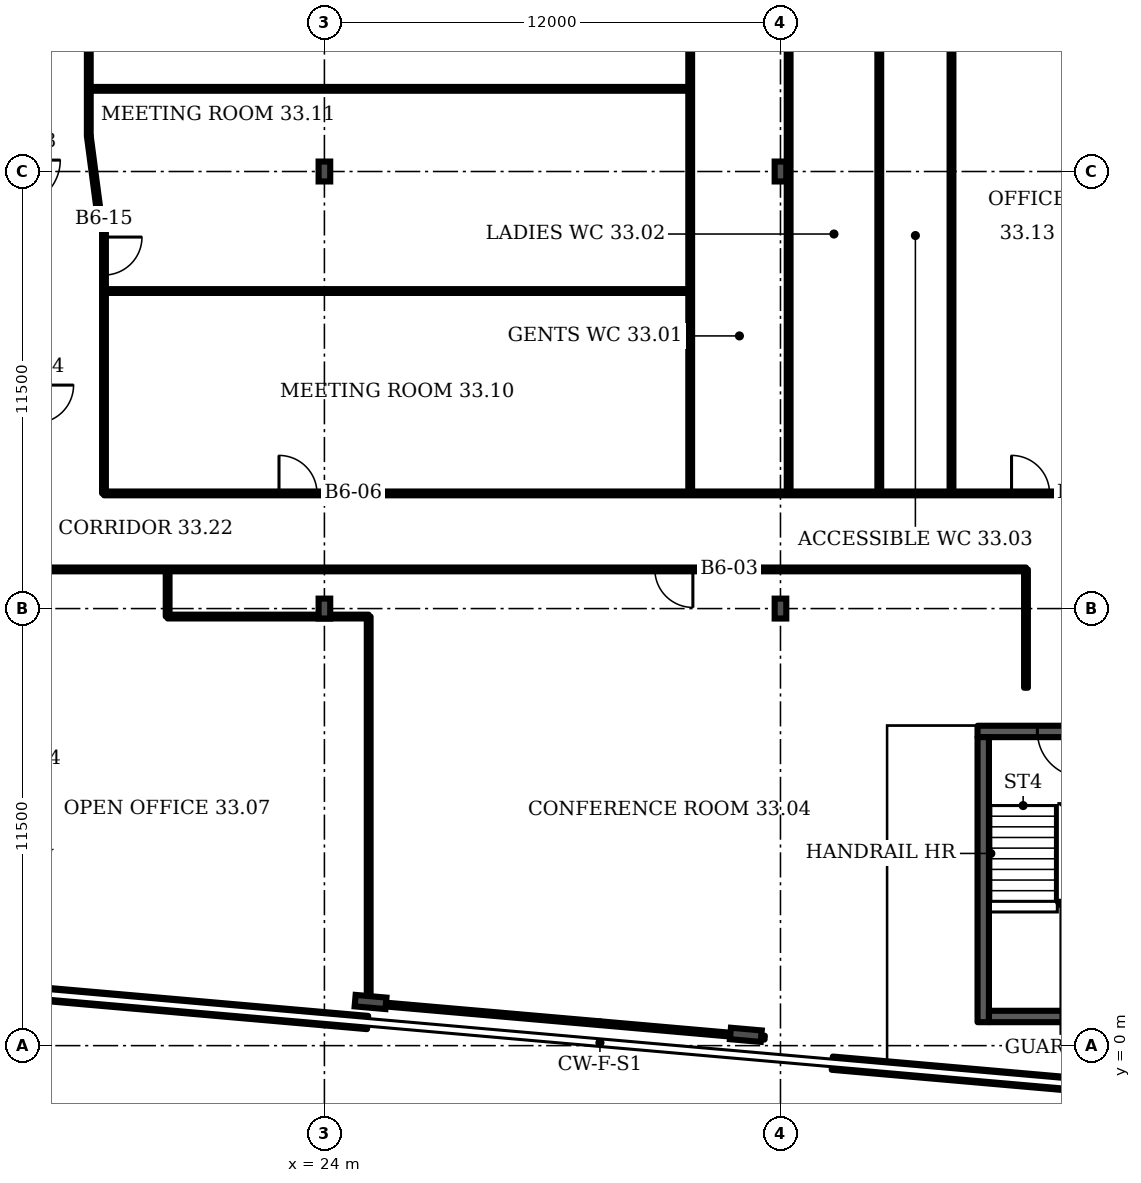
"""IFC4 building model, lengths in metres.
Left out: names, types, materials, properties, quantities, classifications, styles, units other than length and angle.
Written with IfcOpenShell. Run it as: python <this file> out.ifc"""

import sys

from ifc_helpers import new_model, si_unit, direction, frame, frame_2d, origin, origin_2d, place, context, subcontext, project, spatial, rectangle, i_section, extrude, element, fill, save


model = new_model("IFC4")
c1 = context("Model", 3, precision=1e-05, world=origin(), true_north=direction((0.0, 1.0)))
c2 = subcontext(c1, "Body", "Model", "MODEL_VIEW")
j1 = project(units=[si_unit("LENGTHUNIT", "METRE"), si_unit("PLANEANGLEUNIT", "RADIAN")], contexts=[c1])
p1 = place(None, origin())
s1 = spatial("IfcSite", under=j1, at=p1, CompositionType="ELEMENT")
p2 = place(p1, origin())
s2 = spatial("IfcBuilding", under=s1, at=p2, CompositionType="ELEMENT")
p3 = place(p2, frame((0.0, 0.0, 139.9)))
s3 = spatial("IfcBuildingStorey", under=s2, at=p3, CompositionType="ELEMENT", Elevation=139.9)
for number, where, z_axis, x_axis in (
    (1, (25.214, 1.149, 0.0), (0.0, 0.0, 1.0), (-0.087, -0.996, 0.0)),
    (2, (35.089, 0.285, 0.0), (0.0, 0.0, 1.0), (-0.087, -0.996, 0.0)),
):
    element("IfcColumn", number, at=place(p3, frame(where, z_axis=z_axis, x_axis=x_axis)), inside=s3, PredefinedType="COLUMN", context=c2, shape_type="SweptSolid", body=[
        extrude(i_section(OverallWidth=0.303, OverallDepth=0.814, WebThickness=0.021, FlangeThickness=0.04, FilletRadius=0.03, at=origin_2d()), origin(), (0.0, 0.0, 1.0), 3.6),
    ])
for number, where, z_axis, x_axis in (
    (3, (24.0, 11.5, 0.0), (0.0, 0.0, 1.0), (1.0, 0.0, 0.0)),
    (4, (36.0, 11.5, 0.0), (0.0, 0.0, 1.0), (1.0, 0.0, 0.0)),
    (5, (24.0, 23.0, 0.0), (0.0, 0.0, 1.0), (1.0, 0.0, 0.0)),
    (6, (36.0, 23.0, 0.0), (0.0, 0.0, 1.0), (1.0, 0.0, 0.0)),
):
    element("IfcColumn", number, at=place(p3, frame(where, z_axis=z_axis, x_axis=x_axis)), inside=s3, PredefinedType="COLUMN", context=c2, shape_type="SweptSolid", body=[
        extrude(i_section(OverallWidth=0.306, OverallDepth=0.524, WebThickness=0.021, FlangeThickness=0.04, FilletRadius=0.027, at=origin_2d()), origin(), (0.0, 0.0, 1.0), 3.6),
    ])
p4 = place(p3, frame((12.835, 1.685, 0.0), z_axis=(0.0, 0.0, 1.0), x_axis=(0.996192, -0.087173, 0.0)))
e7 = element("IfcWall", 7, at=p4, inside=s3, PredefinedType="SOLIDWALL", context=c2, shape_type="SweptSolid", body=[
    extrude(rectangle(XDim=12.348, YDim=0.35, at=frame_2d((6.174, 0.0))), origin(), (0.0, 0.0, 1.0), 1.0),
])
p5 = place(p3, frame((37.363, -0.461, 0.0), z_axis=(0.0, 0.0, 1.0), x_axis=(0.996194, -0.087159, 0.0)))
e8 = element("IfcWall", 8, at=p5, inside=s3, PredefinedType="SOLIDWALL", context=c2, shape_type="SweptSolid", body=[
    extrude(rectangle(XDim=12.199, YDim=0.35, at=frame_2d((6.099, 0.0))), origin(), (0.0, 0.0, 1.0), 1.0),
])
p6 = place(p3, frame((41.185, 8.267, 0.0), z_axis=(0.0, 0.0, 1.0), x_axis=(1.0, 0.0, 0.0)))
e9 = element("IfcWall", 9, at=p6, inside=s3, PredefinedType="SHEAR", context=c2, shape_type="SweptSolid", body=[
    extrude(rectangle(XDim=4.35, YDim=0.3, at=frame_2d((2.175, 0.0))), origin(), (0.0, 0.0, 1.0), 3.2),
])
p7 = place(p6, frame((1.575, 0.0, 0.0)))
e10 = element("IfcOpeningElement", 10, at=p7, cuts=e9, PredefinedType="OPENING", context=c2, shape_type="SweptSolid", body=[
    extrude(rectangle(XDim=1.2, YDim=2.1, at=frame_2d((0.6, 1.05))), frame((0.0, 0.16, 0.0), z_axis=(0.0, -1.0, 0.0), x_axis=(1.0, 0.0, 0.0)), (0.0, 0.0, 1.0), 0.32),
])
p8 = place(p3, frame((7.02, 12.53, 0.0), z_axis=(0.0, 0.0, 1.0), x_axis=(1.0, 0.0, 0.0)))
e11 = element("IfcWall", 11, at=p8, inside=s3, PredefinedType="PARTITIONING", context=c2, shape_type="SweptSolid", body=[
    extrude(rectangle(XDim=35.44, YDim=0.1, at=frame_2d((17.72, 0.0))), origin(), (0.0, 0.0, 1.0), 3.2),
])
p9 = place(p8, frame((5.6, 0.0, 0.0)))
e12 = element("IfcOpeningElement", 12, at=p9, cuts=e11, PredefinedType="OPENING", context=c2, shape_type="SweptSolid", body=[
    extrude(rectangle(XDim=1.8, YDim=2.1, at=frame_2d((0.9, 1.05))), frame((0.0, 0.06, 0.0), z_axis=(0.0, -1.0, 0.0), x_axis=(1.0, 0.0, 0.0)), (0.0, 0.0, 1.0), 0.12),
])
p10 = place(p8, frame((25.675, 0.0, 0.0)))
e13 = element("IfcOpeningElement", 13, at=p10, cuts=e11, PredefinedType="OPENING", context=c2, shape_type="SweptSolid", body=[
    extrude(rectangle(XDim=1.0, YDim=2.1, at=frame_2d((0.5, 1.05))), frame((0.0, 0.06, 0.0), z_axis=(0.0, -1.0, 0.0), x_axis=(1.0, 0.0, 0.0)), (0.0, 0.0, 1.0), 0.12),
])
p11 = place(p3, frame((17.8, 23.935, 0.0), z_axis=(0.0, 0.0, 1.0), x_axis=(0.0, 1.0, 0.0)))
e14 = element("IfcWall", 14, at=p11, inside=s3, PredefinedType="PARTITIONING", context=c2, shape_type="SweptSolid", body=[
    extrude(rectangle(XDim=6.565, YDim=0.1, at=frame_2d((3.282, 0.0))), origin(), (0.0, 0.0, 1.0), 3.2),
])
p12 = place(p3, frame((17.8, 25.175, 0.0), z_axis=(0.0, 0.0, 1.0), x_axis=(1.0, 0.0, 0.0)))
e15 = element("IfcWall", 15, at=p12, inside=s3, PredefinedType="PARTITIONING", context=c2, shape_type="SweptSolid", body=[
    extrude(rectangle(XDim=15.825, YDim=0.1, at=frame_2d((7.913, 0.0))), origin(), (0.0, 0.0, 1.0), 3.2),
])
p13 = place(p3, frame((18.1, 21.66, 0.0), z_axis=(0.0, 0.0, 1.0), x_axis=(-0.130749, 0.991416, 0.0)))
e16 = element("IfcWall", 16, at=p13, inside=s3, PredefinedType="PARTITIONING", context=c2, shape_type="SweptSolid", body=[
    extrude(rectangle(XDim=2.295, YDim=0.1, at=frame_2d((1.147, 0.0))), origin(), (0.0, 0.0, 1.0), 3.2),
])
p14 = place(p3, frame((18.2, 14.53, 0.0), z_axis=(0.0, 0.0, 1.0), x_axis=(0.0, 1.0, 0.0)))
e17 = element("IfcWall", 17, at=p14, inside=s3, PredefinedType="PARTITIONING", context=c2, shape_type="SweptSolid", body=[
    extrude(rectangle(XDim=7.02, YDim=0.1, at=frame_2d((3.51, 0.0))), origin(), (0.0, 0.0, 1.0), 3.2),
])
p15 = place(p14, frame((5.745, 0.0, 0.0)))
e18 = element("IfcOpeningElement", 18, at=p15, cuts=e17, PredefinedType="OPENING", context=c2, shape_type="SweptSolid", body=[
    extrude(rectangle(XDim=1.0, YDim=2.1, at=frame_2d((0.5, 1.05))), frame((0.0, 0.06, 0.0), z_axis=(0.0, -1.0, 0.0), x_axis=(1.0, 0.0, 0.0)), (0.0, 0.0, 1.0), 0.12),
])
p16 = place(p3, frame((18.2, 14.53, 0.0), z_axis=(0.0, 0.0, 1.0), x_axis=(1.0, 0.0, 0.0)))
e19 = element("IfcWall", 19, at=p16, inside=s3, PredefinedType="PARTITIONING", context=c2, shape_type="SweptSolid", body=[
    extrude(rectangle(XDim=68.41, YDim=0.1, at=frame_2d((34.205, 0.0))), origin(), (0.0, 0.0, 1.0), 3.2),
])
p17 = place(p16, frame((4.605, 0.0, 0.0)))
e20 = element("IfcOpeningElement", 20, at=p17, cuts=e19, PredefinedType="OPENING", context=c2, shape_type="SweptSolid", body=[
    extrude(rectangle(XDim=1.0, YDim=2.1, at=frame_2d((0.5, 1.05))), frame((0.0, 0.06, 0.0), z_axis=(0.0, -1.0, 0.0), x_axis=(1.0, 0.0, 0.0)), (0.0, 0.0, 1.0), 0.12),
])
p18 = place(p16, frame((23.88, 0.0, 0.0)))
e21 = element("IfcOpeningElement", 21, at=p18, cuts=e19, PredefinedType="OPENING", context=c2, shape_type="SweptSolid", body=[
    extrude(rectangle(XDim=1.0, YDim=2.1, at=frame_2d((0.5, 1.05))), frame((0.0, 0.06, 0.0), z_axis=(0.0, -1.0, 0.0), x_axis=(1.0, 0.0, 0.0)), (0.0, 0.0, 1.0), 0.12),
])
p19 = place(p16, frame((27.8, 0.0, 0.0)))
e22 = element("IfcOpeningElement", 22, at=p19, cuts=e19, PredefinedType="OPENING", context=c2, shape_type="SweptSolid", body=[
    extrude(rectangle(XDim=1.0, YDim=2.1, at=frame_2d((0.5, 1.05))), frame((0.0, 0.06, 0.0), z_axis=(0.0, -1.0, 0.0), x_axis=(1.0, 0.0, 0.0)), (0.0, 0.0, 1.0), 0.12),
])
p20 = place(p16, frame((31.8, 0.0, 0.0)))
e23 = element("IfcOpeningElement", 23, at=p20, cuts=e19, PredefinedType="OPENING", context=c2, shape_type="SweptSolid", body=[
    extrude(rectangle(XDim=1.0, YDim=2.1, at=frame_2d((0.5, 1.05))), frame((0.0, 0.06, 0.0), z_axis=(0.0, -1.0, 0.0), x_axis=(1.0, 0.0, 0.0)), (0.0, 0.0, 1.0), 0.12),
])
p21 = place(p16, frame((35.8, 0.0, 0.0)))
e24 = element("IfcOpeningElement", 24, at=p21, cuts=e19, PredefinedType="OPENING", context=c2, shape_type="SweptSolid", body=[
    extrude(rectangle(XDim=1.0, YDim=2.1, at=frame_2d((0.5, 1.05))), frame((0.0, 0.06, 0.0), z_axis=(0.0, -1.0, 0.0), x_axis=(1.0, 0.0, 0.0)), (0.0, 0.0, 1.0), 0.12),
])
p22 = place(p16, frame((41.355, 0.0, 0.0)))
e25 = element("IfcOpeningElement", 25, at=p22, cuts=e19, PredefinedType="OPENING", context=c2, shape_type="SweptSolid", body=[
    extrude(rectangle(XDim=1.0, YDim=2.1, at=frame_2d((0.5, 1.05))), frame((0.0, 0.06, 0.0), z_axis=(0.0, -1.0, 0.0), x_axis=(1.0, 0.0, 0.0)), (0.0, 0.0, 1.0), 0.12),
])
p23 = place(p16, frame((50.88, 0.0, 0.0)))
e26 = element("IfcOpeningElement", 26, at=p23, cuts=e19, PredefinedType="OPENING", context=c2, shape_type="SweptSolid", body=[
    extrude(rectangle(XDim=1.8, YDim=2.1, at=frame_2d((0.9, 1.05))), frame((0.0, 0.06, 0.0), z_axis=(0.0, -1.0, 0.0), x_axis=(1.0, 0.0, 0.0)), (0.0, 0.0, 1.0), 0.12),
])
p24 = place(p16, frame((62.796, 0.0, 0.0)))
e27 = element("IfcOpeningElement", 27, at=p24, cuts=e19, PredefinedType="OPENING", context=c2, shape_type="SweptSolid", body=[
    extrude(rectangle(XDim=1.0, YDim=2.1, at=frame_2d((0.5, 1.05))), frame((0.0, 0.06, 0.0), z_axis=(0.0, -1.0, 0.0), x_axis=(1.0, 0.0, 0.0)), (0.0, 0.0, 1.0), 0.12),
])
p25 = place(p3, frame((18.2, 19.855, 0.0), z_axis=(0.0, 0.0, 1.0), x_axis=(1.0, 0.0, 0.0)))
e28 = element("IfcWall", 28, at=p25, inside=s3, PredefinedType="PARTITIONING", context=c2, shape_type="SweptSolid", body=[
    extrude(rectangle(XDim=15.425, YDim=0.1, at=frame_2d((7.712, 0.0))), origin(), (0.0, 0.0, 1.0), 3.2),
])
p26 = place(p3, frame((18.2, 21.55, 0.0), z_axis=(0.0, 0.0, 1.0), x_axis=(-0.672587, 0.74001, 0.0)))
e29 = element("IfcWall", 29, at=p26, inside=s3, PredefinedType="PARTITIONING", context=c2, shape_type="SweptSolid", body=[
    extrude(rectangle(XDim=0.148, YDim=0.1, at=frame_2d((0.074, 0.0))), origin(), (0.0, 0.0, 1.0), 3.2),
])
p27 = place(p3, frame((19.875, 11.29, 0.0), z_axis=(0.0, 0.0, 1.0), x_axis=(0.0, 1.0, 0.0)))
e30 = element("IfcWall", 30, at=p27, inside=s3, PredefinedType="PARTITIONING", context=c2, shape_type="SweptSolid", body=[
    extrude(rectangle(XDim=1.24, YDim=0.1, at=frame_2d((0.62, 0.0))), origin(), (0.0, 0.0, 1.0), 3.2),
])
p28 = place(p3, frame((19.875, 11.29, 0.0), z_axis=(0.0, 0.0, 1.0), x_axis=(1.0, 0.0, 0.0)))
e31 = element("IfcWall", 31, at=p28, inside=s3, PredefinedType="PARTITIONING", context=c2, shape_type="SweptSolid", body=[
    extrude(rectangle(XDim=5.29, YDim=0.1, at=frame_2d((2.645, 0.0))), origin(), (0.0, 0.0, 1.0), 3.2),
])
p29 = place(p3, frame((25.165, 1.12, 0.0), z_axis=(0.0, 0.0, 1.0), x_axis=(0.0, 1.0, 0.0)))
e32 = element("IfcWall", 32, at=p29, inside=s3, PredefinedType="PARTITIONING", context=c2, shape_type="SweptSolid", body=[
    extrude(rectangle(XDim=10.17, YDim=0.1, at=frame_2d((5.085, 0.0))), origin(), (0.0, 0.0, 1.0), 3.2),
])
p30 = place(p3, frame((31.25, 0.59, 0.0), z_axis=(0.0, 0.0, 1.0), x_axis=(-0.996225, 0.086776, 0.0)))
e33 = element("IfcWall", 33, at=p30, inside=s3, PredefinedType="PARTITIONING", context=c2, shape_type="SweptSolid", body=[
    extrude(rectangle(XDim=6.108, YDim=0.1, at=frame_2d((3.054, 0.0))), origin(), (0.0, 0.0, 1.0), 2.58),
])
p31 = place(p3, frame((33.625, 14.53, 0.0), z_axis=(0.0, 0.0, 1.0), x_axis=(0.0, 1.0, 0.0)))
e34 = element("IfcWall", 34, at=p31, inside=s3, PredefinedType="PARTITIONING", context=c2, shape_type="SweptSolid", body=[
    extrude(rectangle(XDim=15.96, YDim=0.1, at=frame_2d((7.98, 0.0))), origin(), (0.0, 0.0, 1.0), 3.2),
])
p32 = place(p3, frame((35.585, 0.21, 0.0), z_axis=(0.0, 0.0, 1.0), x_axis=(-0.996173, 0.087353, 0.0)))
e35 = element("IfcWall", 35, at=p32, inside=s3, PredefinedType="PARTITIONING", context=c2, shape_type="SweptSolid", body=[
    extrude(rectangle(XDim=4.352, YDim=0.1, at=frame_2d((2.176, 0.0))), origin(), (0.0, 0.0, 1.0), 2.58),
])
for number, where, z_axis, x_axis in (
    (36, (36.215, 14.53, 0.0), (0.0, 0.0, 1.0), (0.0, 1.0, 0.0)),
    (37, (38.6, 14.53, 0.0), (0.0, 0.0, 1.0), (0.0, 1.0, 0.0)),
    (38, (40.5, 14.53, 0.0), (0.0, 0.0, 1.0), (0.0, 1.0, 0.0)),
):
    element("IfcWall", number, at=place(p3, frame(where, z_axis=z_axis, x_axis=x_axis)), inside=s3, PredefinedType="PARTITIONING", context=c2, shape_type="SweptSolid", body=[
        extrude(rectangle(XDim=14.17, YDim=0.1, at=frame_2d((7.085, 0.0))), origin(), (0.0, 0.0, 1.0), 3.2),
    ])
p33 = place(p3, frame((42.46, 9.417, 0.0), z_axis=(0.0, 0.0, 1.0), x_axis=(0.0, 1.0, 0.0)))
e39 = element("IfcWall", 39, at=p33, inside=s3, PredefinedType="PARTITIONING", context=c2, shape_type="SweptSolid", body=[
    extrude(rectangle(XDim=3.113, YDim=0.1, at=frame_2d((1.557, 0.0))), origin(), (0.0, 0.0, 1.0), 3.2),
])
p34 = place(p3, frame((41.335, 0.617, 0.0), z_axis=(0.0, 0.0, 1.0), x_axis=(0.0, 1.0, 0.0)))
e40 = element("IfcWall", 40, at=p34, inside=s3, PredefinedType="SHEAR", context=c2, shape_type="SweptSolid", body=[
    extrude(rectangle(XDim=7.5, YDim=0.3, at=frame_2d((3.75, 0.0))), origin(), (0.0, 0.0, 1.0), 3.2),
])
p35 = place(p3, frame((41.485, 0.767, 0.0), z_axis=(0.0, 0.0, 1.0), x_axis=(1.0, 0.0, 0.0)))
e41 = element("IfcWall", 41, at=p35, inside=s3, PredefinedType="SHEAR", context=c2, shape_type="SweptSolid", body=[
    extrude(rectangle(XDim=3.75, YDim=0.3, at=frame_2d((1.875, 0.0))), origin(), (0.0, 0.0, 1.0), 3.2),
])
p36 = place(p7, origin())
e42 = element("IfcDoor", 42, at=p36, inside=s3, OperationType="SINGLE_SWING_RIGHT", PredefinedType="DOOR", context=c2, shape_type="SweptSolid", body=[
    extrude(rectangle(XDim=1.2, YDim=2.1, at=frame_2d((0.6, 1.05))), frame((0.0, 0.025, 0.0), z_axis=(0.0, -1.0, 0.0), x_axis=(1.0, 0.0, 0.0)), (0.0, 0.0, 1.0), 0.05),
])
fill(e10, e42)
p37 = place(p10, origin())
e43 = element("IfcDoor", 43, at=p37, inside=s3, OperationType="SINGLE_SWING_RIGHT", PredefinedType="DOOR", context=c2, shape_type="SweptSolid", body=[
    extrude(rectangle(XDim=1.0, YDim=2.1, at=frame_2d((0.5, 1.05))), frame((0.0, 0.025, 0.0), z_axis=(0.0, -1.0, 0.0), x_axis=(1.0, 0.0, 0.0)), (0.0, 0.0, 1.0), 0.05),
])
fill(e13, e43)
p38 = place(p17, origin())
e44 = element("IfcDoor", 44, at=p38, inside=s3, OperationType="SINGLE_SWING_LEFT", PredefinedType="DOOR", context=c2, shape_type="SweptSolid", body=[
    extrude(rectangle(XDim=1.0, YDim=2.1, at=frame_2d((0.5, 1.05))), frame((0.0, 0.025, 0.0), z_axis=(0.0, -1.0, 0.0), x_axis=(1.0, 0.0, 0.0)), (0.0, 0.0, 1.0), 0.05),
])
fill(e20, e44)
p39 = place(p18, origin())
e45 = element("IfcDoor", 45, at=p39, inside=s3, OperationType="SINGLE_SWING_LEFT", PredefinedType="DOOR", context=c2, shape_type="SweptSolid", body=[
    extrude(rectangle(XDim=1.0, YDim=2.1, at=frame_2d((0.5, 1.05))), frame((0.0, 0.025, 0.0), z_axis=(0.0, -1.0, 0.0), x_axis=(1.0, 0.0, 0.0)), (0.0, 0.0, 1.0), 0.05),
])
fill(e21, e45)
p40 = place(p15, origin())
e46 = element("IfcDoor", 46, at=p40, inside=s3, OperationType="SINGLE_SWING_RIGHT", PredefinedType="DOOR", context=c2, shape_type="SweptSolid", body=[
    extrude(rectangle(XDim=1.0, YDim=2.1, at=frame_2d((0.5, 1.05))), frame((0.0, 0.025, 0.0), z_axis=(0.0, -1.0, 0.0), x_axis=(1.0, 0.0, 0.0)), (0.0, 0.0, 1.0), 0.05),
])
fill(e18, e46)
save(model, sys.argv[1])
